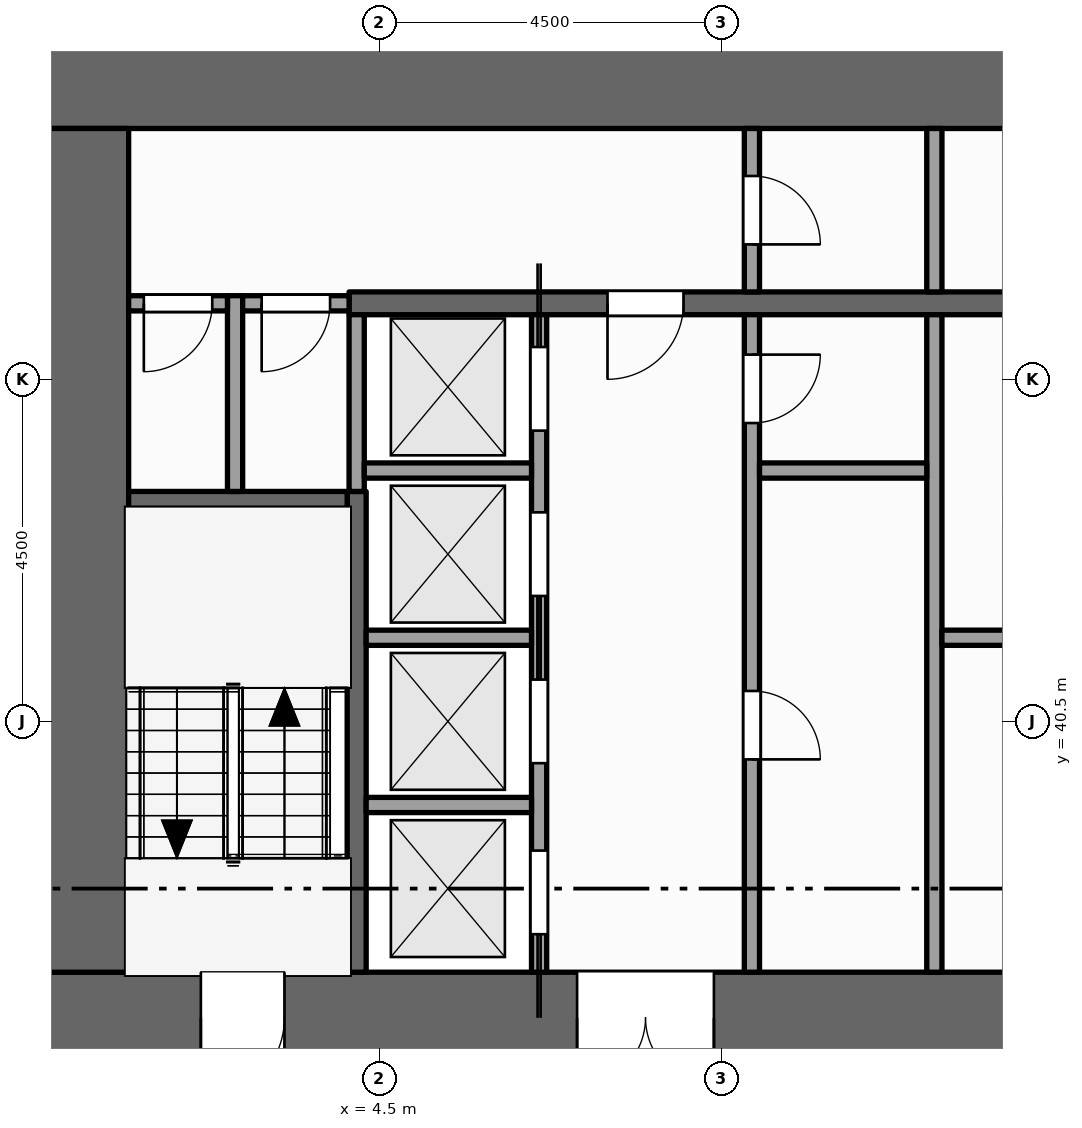
"""IFC4 building model, lengths in metres.
Left out: names, types, materials, properties, quantities, classifications, styles, units other than length and angle.
Written with IfcOpenShell. Run it as: python <this file> out.ifc"""

import sys

from ifc_helpers import new_model, si_unit, direction, frame, frame_2d, origin, place, context, subcontext, project, spatial, rectangle, extrude, element, fill, save


model = new_model("IFC4")
c1 = context("Model", 3, precision=1e-05, world=origin(), true_north=direction((0.0, 1.0)))
c2 = subcontext(c1, "Body", "Model", "MODEL_VIEW")
j1 = project(units=[si_unit("LENGTHUNIT", "METRE"), si_unit("PLANEANGLEUNIT", "RADIAN")], contexts=[c1])
p1 = place(None, origin())
s1 = spatial("IfcSite", under=j1, at=p1, CompositionType="ELEMENT")
p2 = place(p1, origin())
s2 = spatial("IfcBuilding", under=s1, at=p2, CompositionType="ELEMENT")
p3 = place(p2, frame((0.0, 0.0, 77.0)))
s3 = spatial("IfcBuildingStorey", under=s2, at=p3, CompositionType="ELEMENT", Elevation=77.0)
p4 = place(p3, frame((0.0, 36.6, -0.15), z_axis=(0.0, 0.0, 1.0), x_axis=(1.0, 0.0, 0.0)))
e1 = element("IfcWall", 1, at=p4, inside=s3, PredefinedType="SHEAR", context=c2, shape_type="SweptSolid", body=[
    extrude(rectangle(XDim=22.5, YDim=1.2, at=frame_2d((11.25, 0.0))), origin(), (0.0, 0.0, 1.0), 6.0),
])
p5 = place(p4, frame((7.1, 0.0, 0.15)))
e2 = element("IfcOpeningElement", 2, at=p5, cuts=e1, PredefinedType="OPENING", context=c2, shape_type="SweptSolid", body=[
    extrude(rectangle(XDim=1.8, YDim=2.1, at=frame_2d((0.9, 1.05))), frame((0.0, 0.61, 0.0), z_axis=(0.0, -1.0, 0.0), x_axis=(1.0, 0.0, 0.0)), (0.0, 0.0, 1.0), 1.22),
])
p6 = place(p4, frame((13.15, 0.0, 0.15)))
e3 = element("IfcOpeningElement", 3, at=p6, cuts=e1, PredefinedType="OPENING", context=c2, shape_type="SweptSolid", body=[
    extrude(rectangle(XDim=1.1, YDim=2.1, at=frame_2d((0.55, 1.05))), frame((0.0, 0.61, 0.0), z_axis=(0.0, -1.0, 0.0), x_axis=(1.0, 0.0, 0.0)), (0.0, 0.0, 1.0), 1.22),
])
p7 = place(p4, frame((2.15, 0.0, 0.15)))
e4 = element("IfcOpeningElement", 4, at=p7, cuts=e1, PredefinedType="OPENING", context=c2, shape_type="SweptSolid", body=[
    extrude(rectangle(XDim=1.1, YDim=2.1, at=frame_2d((0.55, 1.05))), frame((0.0, 0.61, 0.0), z_axis=(0.0, -1.0, 0.0), x_axis=(1.0, 0.0, 0.0)), (0.0, 0.0, 1.0), 1.22),
])
p8 = place(p4, frame((19.35, 0.0, 0.15)))
e5 = element("IfcOpeningElement", 5, at=p8, cuts=e1, PredefinedType="OPENING", context=c2, shape_type="SweptSolid", body=[
    extrude(rectangle(XDim=1.1, YDim=2.1, at=frame_2d((0.55, 1.05))), frame((0.0, 0.61, 0.0), z_axis=(0.0, -1.0, 0.0), x_axis=(1.0, 0.0, 0.0)), (0.0, 0.0, 1.0), 1.22),
])
p9 = place(p3, frame((0.0, 48.9, -0.15), z_axis=(0.0, 0.0, 1.0), x_axis=(1.0, 0.0, 0.0)))
e6 = element("IfcWall", 6, at=p9, inside=s3, PredefinedType="SHEAR", context=c2, shape_type="SweptSolid", body=[
    extrude(rectangle(XDim=22.5, YDim=1.2, at=frame_2d((11.25, 0.0))), origin(), (0.0, 0.0, 1.0), 6.0),
])
p10 = place(p3, frame((0.6, 37.2, -0.15), z_axis=(0.0, 0.0, 1.0), x_axis=(0.0, 1.0, 0.0)))
e7 = element("IfcWall", 7, at=p10, inside=s3, PredefinedType="SHEAR", context=c2, shape_type="SweptSolid", body=[
    extrude(rectangle(XDim=11.1, YDim=1.2, at=frame_2d((5.55, 0.0))), origin(), (0.0, 0.0, 1.0), 6.0),
])
p11 = place(p3, frame((2.6, 43.525, 0.0), z_axis=(0.0, 0.0, 1.0), x_axis=(0.0, 1.0, 0.0)))
e8 = element("IfcWall", 8, at=p11, inside=s3, PredefinedType="PARTITIONING", context=c2, shape_type="SweptSolid", body=[
    extrude(rectangle(XDim=2.575, YDim=0.2, at=frame_2d((1.288, 0.0))), origin(), (0.0, 0.0, 1.0), 5.85),
])
p12 = place(p3, frame((4.2, 37.2, 0.0), z_axis=(0.0, 0.0, 1.0), x_axis=(0.0, 1.0, 0.0)))
e9 = element("IfcWall", 9, at=p12, inside=s3, PredefinedType="SHEAR", context=c2, shape_type="SweptSolid", body=[
    extrude(rectangle(XDim=6.325, YDim=0.25, at=frame_2d((3.163, 0.0))), origin(), (0.0, 0.0, 1.0), 5.85),
])
p13 = place(p3, frame((4.2, 43.525, 0.0), z_axis=(0.0, 0.0, 1.0), x_axis=(0.0, 1.0, 0.0)))
e10 = element("IfcWall", 10, at=p13, inside=s3, PredefinedType="SOLIDWALL", context=c2, shape_type="SweptSolid", body=[
    extrude(rectangle(XDim=2.325, YDim=0.2, at=frame_2d((1.163, 0.0))), origin(), (0.0, 0.0, 1.0), 5.85),
])
p14 = place(p3, frame((6.6, 37.2, 0.0), z_axis=(0.0, 0.0, 1.0), x_axis=(0.0, 1.0, 0.0)))
e11 = element("IfcWall", 11, at=p14, inside=s3, PredefinedType="SOLIDWALL", context=c2, shape_type="SweptSolid", body=[
    extrude(rectangle(XDim=8.65, YDim=0.2, at=frame_2d((4.325, 0.0))), origin(), (0.0, 0.0, 1.0), 5.85),
])
p15 = place(p14, frame((0.5, 0.0, 0.012)))
e12 = element("IfcOpeningElement", 12, at=p15, cuts=e11, PredefinedType="OPENING", context=c2, shape_type="SweptSolid", body=[
    extrude(rectangle(XDim=1.1, YDim=2.1, at=frame_2d((0.55, 1.05))), frame((0.0, 0.11, 0.0), z_axis=(0.0, -1.0, 0.0), x_axis=(1.0, 0.0, 0.0)), (0.0, 0.0, 1.0), 0.22),
])
p16 = place(p14, frame((2.75, 0.0, 0.012)))
e13 = element("IfcOpeningElement", 13, at=p16, cuts=e11, PredefinedType="OPENING", context=c2, shape_type="SweptSolid", body=[
    extrude(rectangle(XDim=1.1, YDim=2.1, at=frame_2d((0.55, 1.05))), frame((0.0, 0.11, 0.0), z_axis=(0.0, -1.0, 0.0), x_axis=(1.0, 0.0, 0.0)), (0.0, 0.0, 1.0), 0.22),
])
p17 = place(p14, frame((4.95, 0.0, 0.012)))
e14 = element("IfcOpeningElement", 14, at=p17, cuts=e11, PredefinedType="OPENING", context=c2, shape_type="SweptSolid", body=[
    extrude(rectangle(XDim=1.1, YDim=2.1, at=frame_2d((0.55, 1.05))), frame((0.0, 0.11, 0.0), z_axis=(0.0, -1.0, 0.0), x_axis=(1.0, 0.0, 0.0)), (0.0, 0.0, 1.0), 0.22),
])
p18 = place(p14, frame((7.125, 0.0, 0.012)))
e15 = element("IfcOpeningElement", 15, at=p18, cuts=e11, PredefinedType="OPENING", context=c2, shape_type="SweptSolid", body=[
    extrude(rectangle(XDim=1.1, YDim=2.1, at=frame_2d((0.55, 1.05))), frame((0.0, 0.11, 0.0), z_axis=(0.0, -1.0, 0.0), x_axis=(1.0, 0.0, 0.0)), (0.0, 0.0, 1.0), 0.22),
])
p19 = place(p3, frame((9.4, 37.2, 0.0), z_axis=(0.0, 0.0, 1.0), x_axis=(0.0, 1.0, 0.0)))
e16 = element("IfcWall", 16, at=p19, inside=s3, PredefinedType="PARTITIONING", context=c2, shape_type="SweptSolid", body=[
    extrude(rectangle(XDim=8.65, YDim=0.2, at=frame_2d((4.325, 0.0))), origin(), (0.0, 0.0, 1.0), 5.85),
])
p20 = place(p19, frame((2.8, 0.0, 0.0)))
e17 = element("IfcOpeningElement", 17, at=p20, cuts=e16, PredefinedType="OPENING", context=c2, shape_type="SweptSolid", body=[
    extrude(rectangle(XDim=0.9, YDim=2.1, at=frame_2d((0.45, 1.05))), frame((0.0, 0.11, 0.0), z_axis=(0.0, -1.0, 0.0), x_axis=(1.0, 0.0, 0.0)), (0.0, 0.0, 1.0), 0.22),
])
p21 = place(p19, frame((7.225, 0.0, 0.0)))
e18 = element("IfcOpeningElement", 18, at=p21, cuts=e16, PredefinedType="OPENING", context=c2, shape_type="SweptSolid", body=[
    extrude(rectangle(XDim=0.9, YDim=2.1, at=frame_2d((0.45, 1.05))), frame((0.0, 0.11, 0.0), z_axis=(0.0, -1.0, 0.0), x_axis=(1.0, 0.0, 0.0)), (0.0, 0.0, 1.0), 0.22),
])
p22 = place(p3, frame((9.4, 46.15, 0.0), z_axis=(0.0, 0.0, 1.0), x_axis=(0.0, 1.0, 0.0)))
e19 = element("IfcWall", 19, at=p22, inside=s3, PredefinedType="PARTITIONING", context=c2, shape_type="SweptSolid", body=[
    extrude(rectangle(XDim=2.15, YDim=0.2, at=frame_2d((1.075, 0.0))), origin(), (0.0, 0.0, 1.0), 5.85),
])
p23 = place(p22, frame((0.625, 0.0, 0.0)))
e20 = element("IfcOpeningElement", 20, at=p23, cuts=e19, PredefinedType="OPENING", context=c2, shape_type="SweptSolid", body=[
    extrude(rectangle(XDim=0.9, YDim=2.1, at=frame_2d((0.45, 1.05))), frame((0.0, 0.11, 0.0), z_axis=(0.0, -1.0, 0.0), x_axis=(1.0, 0.0, 0.0)), (0.0, 0.0, 1.0), 0.22),
])
p24 = place(p3, frame((11.8, 37.2, 0.0), z_axis=(0.0, 0.0, 1.0), x_axis=(0.0, 1.0, 0.0)))
e21 = element("IfcWall", 21, at=p24, inside=s3, PredefinedType="PARTITIONING", context=c2, shape_type="SweptSolid", body=[
    extrude(rectangle(XDim=8.65, YDim=0.2, at=frame_2d((4.325, 0.0))), origin(), (0.0, 0.0, 1.0), 5.85),
])
p25 = place(p3, frame((11.8, 46.15, 0.0), z_axis=(0.0, 0.0, 1.0), x_axis=(0.0, 1.0, 0.0)))
e22 = element("IfcWall", 22, at=p25, inside=s3, PredefinedType="PARTITIONING", context=c2, shape_type="SweptSolid", body=[
    extrude(rectangle(XDim=2.15, YDim=0.2, at=frame_2d((1.075, 0.0))), origin(), (0.0, 0.0, 1.0), 5.85),
])
for number, where, z_axis, x_axis in (
    (23, (4.325, 39.4, 0.0), (0.0, 0.0, 1.0), (1.0, 0.0, 0.0)),
    (24, (4.325, 41.6, 0.0), (0.0, 0.0, 1.0), (1.0, 0.0, 0.0)),
):
    element("IfcWall", number, at=place(p3, frame(where, z_axis=z_axis, x_axis=x_axis)), inside=s3, PredefinedType="SOLIDWALL", context=c2, shape_type="SweptSolid", body=[
        extrude(rectangle(XDim=2.175, YDim=0.2, at=frame_2d((1.087, 0.0))), origin(), (0.0, 0.0, 1.0), 5.85),
    ])
p26 = place(p3, frame((11.9, 41.6, 0.0), z_axis=(0.0, 0.0, 1.0), x_axis=(1.0, 0.0, 0.0)))
e25 = element("IfcWall", 25, at=p26, inside=s3, PredefinedType="PARTITIONING", context=c2, shape_type="SweptSolid", body=[
    extrude(rectangle(XDim=3.6, YDim=0.2, at=frame_2d((1.8, 0.0))), origin(), (0.0, 0.0, 1.0), 5.85),
])
p27 = place(p26, frame((1.3, 0.0, 0.0)))
e26 = element("IfcOpeningElement", 26, at=p27, cuts=e25, PredefinedType="OPENING", context=c2, shape_type="SweptSolid", body=[
    extrude(rectangle(XDim=1.0, YDim=2.1, at=frame_2d((0.5, 1.05))), frame((0.0, 0.11, 0.0), z_axis=(0.0, -1.0, 0.0), x_axis=(1.0, 0.0, 0.0)), (0.0, 0.0, 1.0), 0.22),
])
p28 = place(p3, frame((1.2, 43.4, 0.0), z_axis=(0.0, 0.0, 1.0), x_axis=(1.0, 0.0, 0.0)))
e27 = element("IfcWall", 27, at=p28, inside=s3, PredefinedType="SHEAR", context=c2, shape_type="SweptSolid", body=[
    extrude(rectangle(XDim=2.875, YDim=0.25, at=frame_2d((1.438, 0.0))), origin(), (0.0, 0.0, 1.0), 5.85),
])
p29 = place(p3, frame((4.3, 43.8, 0.0), z_axis=(0.0, 0.0, 1.0), x_axis=(1.0, 0.0, 0.0)))
e28 = element("IfcWall", 28, at=p29, inside=s3, PredefinedType="SOLIDWALL", context=c2, shape_type="SweptSolid", body=[
    extrude(rectangle(XDim=2.2, YDim=0.2, at=frame_2d((1.1, 0.0))), origin(), (0.0, 0.0, 1.0), 5.85),
])
p30 = place(p3, frame((9.5, 43.8, 0.0), z_axis=(0.0, 0.0, 1.0), x_axis=(1.0, 0.0, 0.0)))
e29 = element("IfcWall", 29, at=p30, inside=s3, PredefinedType="PARTITIONING", context=c2, shape_type="SweptSolid", body=[
    extrude(rectangle(XDim=2.2, YDim=0.2, at=frame_2d((1.1, 0.0))), origin(), (0.0, 0.0, 1.0), 5.85),
])
p31 = place(p3, frame((1.2, 46.0, 0.0), z_axis=(0.0, 0.0, 1.0), x_axis=(1.0, 0.0, 0.0)))
e30 = element("IfcWall", 30, at=p31, inside=s3, PredefinedType="PARTITIONING", context=c2, shape_type="SweptSolid", body=[
    extrude(rectangle(XDim=1.3, YDim=0.2, at=frame_2d((0.65, 0.0))), origin(), (0.0, 0.0, 1.0), 5.85),
])
p32 = place(p31, frame((0.2, 0.0, 0.0)))
e31 = element("IfcOpeningElement", 31, at=p32, cuts=e30, PredefinedType="OPENING", context=c2, shape_type="SweptSolid", body=[
    extrude(rectangle(XDim=0.9, YDim=2.1, at=frame_2d((0.45, 1.05))), frame((0.0, 0.11, 0.0), z_axis=(0.0, -1.0, 0.0), x_axis=(1.0, 0.0, 0.0)), (0.0, 0.0, 1.0), 0.22),
])
p33 = place(p3, frame((2.7, 46.0, 0.0), z_axis=(0.0, 0.0, 1.0), x_axis=(1.0, 0.0, 0.0)))
e32 = element("IfcWall", 32, at=p33, inside=s3, PredefinedType="PARTITIONING", context=c2, shape_type="SweptSolid", body=[
    extrude(rectangle(XDim=1.4, YDim=0.2, at=frame_2d((0.7, 0.0))), origin(), (0.0, 0.0, 1.0), 5.85),
])
p34 = place(p33, frame((0.25, 0.0, 0.0)))
e33 = element("IfcOpeningElement", 33, at=p34, cuts=e32, PredefinedType="OPENING", context=c2, shape_type="SweptSolid", body=[
    extrude(rectangle(XDim=0.9, YDim=2.1, at=frame_2d((0.45, 1.05))), frame((0.0, 0.11, 0.0), z_axis=(0.0, -1.0, 0.0), x_axis=(1.0, 0.0, 0.0)), (0.0, 0.0, 1.0), 0.22),
])
p35 = place(p3, frame((4.1, 46.0, 0.0), z_axis=(0.0, 0.0, 1.0), x_axis=(1.0, 0.0, 0.0)))
e34 = element("IfcWall", 34, at=p35, inside=s3, PredefinedType="SHEAR", context=c2, shape_type="SweptSolid", body=[
    extrude(rectangle(XDim=14.5, YDim=0.3, at=frame_2d((7.25, 0.0))), origin(), (0.0, 0.0, 1.0), 5.85),
])
p36 = place(p35, frame((3.4, 0.0, 0.0)))
e35 = element("IfcOpeningElement", 35, at=p36, cuts=e34, PredefinedType="OPENING", context=c2, shape_type="SweptSolid", body=[
    extrude(rectangle(XDim=1.0, YDim=2.1, at=frame_2d((0.5, 1.05))), frame((0.0, 0.16, 0.0), z_axis=(0.0, -1.0, 0.0), x_axis=(1.0, 0.0, 0.0)), (0.0, 0.0, 1.0), 0.32),
])
p37 = place(p35, frame((9.1, 0.0, 0.0)))
e36 = element("IfcOpeningElement", 36, at=p37, cuts=e34, PredefinedType="OPENING", context=c2, shape_type="SweptSolid", body=[
    extrude(rectangle(XDim=1.0, YDim=2.1, at=frame_2d((0.5, 1.05))), frame((0.0, 0.16, 0.0), z_axis=(0.0, -1.0, 0.0), x_axis=(1.0, 0.0, 0.0)), (0.0, 0.0, 1.0), 0.32),
])
p38 = place(p15, origin())
e37 = element("IfcDoor", 37, at=p38, inside=s3, OperationType="SLIDING_TO_LEFT", PredefinedType="DOOR", context=c2, shape_type="SweptSolid", body=[
    extrude(rectangle(XDim=1.1, YDim=2.1, at=frame_2d((0.55, 1.05))), frame((0.0, 0.025, 0.0), z_axis=(0.0, -1.0, 0.0), x_axis=(1.0, 0.0, 0.0)), (0.0, 0.0, 1.0), 0.05),
])
fill(e12, e37)
p39 = place(p16, origin())
e38 = element("IfcDoor", 38, at=p39, inside=s3, OperationType="SLIDING_TO_RIGHT", PredefinedType="DOOR", context=c2, shape_type="SweptSolid", body=[
    extrude(rectangle(XDim=1.1, YDim=2.1, at=frame_2d((0.55, 1.05))), frame((0.0, 0.025, 0.0), z_axis=(0.0, -1.0, 0.0), x_axis=(1.0, 0.0, 0.0)), (0.0, 0.0, 1.0), 0.05),
])
fill(e13, e38)
p40 = place(p17, origin())
e39 = element("IfcDoor", 39, at=p40, inside=s3, OperationType="SLIDING_TO_LEFT", PredefinedType="DOOR", context=c2, shape_type="SweptSolid", body=[
    extrude(rectangle(XDim=1.1, YDim=2.1, at=frame_2d((0.55, 1.05))), frame((0.0, 0.025, 0.0), z_axis=(0.0, -1.0, 0.0), x_axis=(1.0, 0.0, 0.0)), (0.0, 0.0, 1.0), 0.05),
])
fill(e14, e39)
p41 = place(p18, origin())
e40 = element("IfcDoor", 40, at=p41, inside=s3, OperationType="SLIDING_TO_RIGHT", PredefinedType="DOOR", context=c2, shape_type="SweptSolid", body=[
    extrude(rectangle(XDim=1.1, YDim=2.1, at=frame_2d((0.55, 1.05))), frame((0.0, 0.025, 0.0), z_axis=(0.0, -1.0, 0.0), x_axis=(1.0, 0.0, 0.0)), (0.0, 0.0, 1.0), 0.05),
])
fill(e15, e40)
p42 = place(p5, origin())
e41 = element("IfcDoor", 41, at=p42, inside=s3, OperationType="DOUBLE_DOOR_SINGLE_SWING", PredefinedType="DOOR", context=c2, shape_type="SweptSolid", body=[
    extrude(rectangle(XDim=1.8, YDim=2.1, at=frame_2d((0.9, 1.05))), frame((0.0, 0.025, 0.0), z_axis=(0.0, -1.0, 0.0), x_axis=(1.0, 0.0, 0.0)), (0.0, 0.0, 1.0), 0.05),
])
fill(e2, e41)
p43 = place(p36, origin())
e42 = element("IfcDoor", 42, at=p43, inside=s3, OperationType="SINGLE_SWING_LEFT", PredefinedType="DOOR", context=c2, shape_type="SweptSolid", body=[
    extrude(rectangle(XDim=1.0, YDim=2.1, at=frame_2d((0.5, 1.05))), frame((0.0, 0.025, 0.0), z_axis=(0.0, -1.0, 0.0), x_axis=(1.0, 0.0, 0.0)), (0.0, 0.0, 1.0), 0.05),
])
fill(e35, e42)
p44 = place(p23, origin())
e43 = element("IfcDoor", 43, at=p44, inside=s3, OperationType="SINGLE_SWING_LEFT", PredefinedType="DOOR", context=c2, shape_type="SweptSolid", body=[
    extrude(rectangle(XDim=0.9, YDim=2.1, at=frame_2d((0.45, 1.05))), frame((0.0, 0.025, 0.0), z_axis=(0.0, -1.0, 0.0), x_axis=(1.0, 0.0, 0.0)), (0.0, 0.0, 1.0), 0.05),
])
fill(e20, e43)
p45 = place(p7, origin())
e44 = element("IfcDoor", 44, at=p45, inside=s3, OperationType="SINGLE_SWING_LEFT", PredefinedType="DOOR", context=c2, shape_type="SweptSolid", body=[
    extrude(rectangle(XDim=1.1, YDim=2.1, at=frame_2d((0.55, 1.05))), frame((0.0, 0.025, 0.0), z_axis=(0.0, -1.0, 0.0), x_axis=(1.0, 0.0, 0.0)), (0.0, 0.0, 1.0), 0.05),
])
fill(e4, e44)
p46 = place(p32, origin())
e45 = element("IfcDoor", 45, at=p46, inside=s3, OperationType="SINGLE_SWING_LEFT", PredefinedType="DOOR", context=c2, shape_type="SweptSolid", body=[
    extrude(rectangle(XDim=0.9, YDim=2.1, at=frame_2d((0.45, 1.05))), frame((0.0, 0.025, 0.0), z_axis=(0.0, -1.0, 0.0), x_axis=(1.0, 0.0, 0.0)), (0.0, 0.0, 1.0), 0.05),
])
fill(e31, e45)
p47 = place(p34, origin())
e46 = element("IfcDoor", 46, at=p47, inside=s3, OperationType="SINGLE_SWING_LEFT", PredefinedType="DOOR", context=c2, shape_type="SweptSolid", body=[
    extrude(rectangle(XDim=0.9, YDim=2.1, at=frame_2d((0.45, 1.05))), frame((0.0, 0.025, 0.0), z_axis=(0.0, -1.0, 0.0), x_axis=(1.0, 0.0, 0.0)), (0.0, 0.0, 1.0), 0.05),
])
fill(e33, e46)
p48 = place(p20, origin())
e47 = element("IfcDoor", 47, at=p48, inside=s3, OperationType="SINGLE_SWING_LEFT", PredefinedType="DOOR", context=c2, shape_type="SweptSolid", body=[
    extrude(rectangle(XDim=0.9, YDim=2.1, at=frame_2d((0.45, 1.05))), frame((0.0, 0.025, 0.0), z_axis=(0.0, -1.0, 0.0), x_axis=(1.0, 0.0, 0.0)), (0.0, 0.0, 1.0), 0.05),
])
fill(e17, e47)
p49 = place(p21, origin())
e48 = element("IfcDoor", 48, at=p49, inside=s3, OperationType="SINGLE_SWING_RIGHT", PredefinedType="DOOR", context=c2, shape_type="SweptSolid", body=[
    extrude(rectangle(XDim=0.9, YDim=2.1, at=frame_2d((0.45, 1.05))), frame((0.0, 0.025, 0.0), z_axis=(0.0, -1.0, 0.0), x_axis=(1.0, 0.0, 0.0)), (0.0, 0.0, 1.0), 0.05),
])
fill(e18, e48)
save(model, sys.argv[1])
